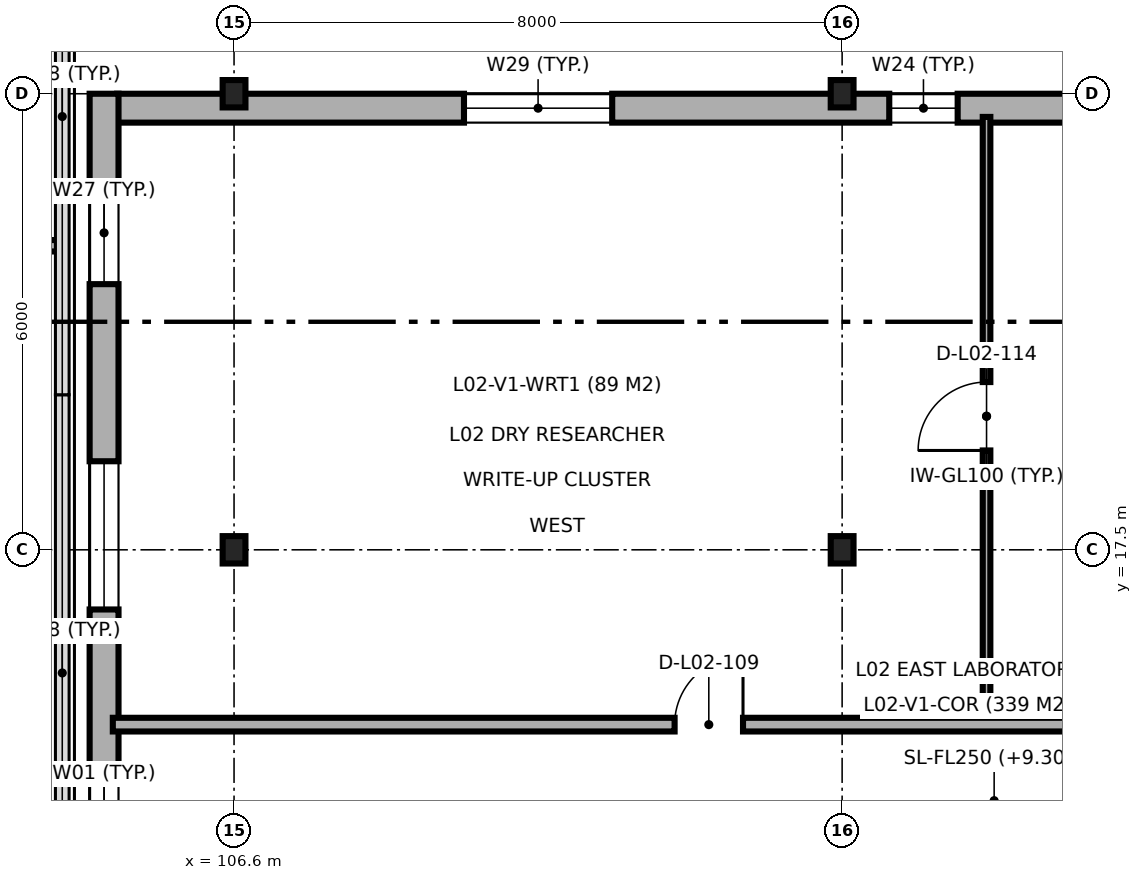
"""IFC4 building model, lengths in metres.
Left out: names, types, materials, properties, quantities, classifications, styles, units other than length and angle.
Written with IfcOpenShell. Run it as: python <this file> out.ifc"""

import sys

from ifc_helpers import new_model, si_unit, direction, frame, frame_2d, origin, origin_2d, place, context, subcontext, project, spatial, rectangle, i_section, extrude, element, fill, save


model = new_model("IFC4")
c1 = context("Model", 3, precision=1e-05, world=origin(), true_north=direction((0.0, 1.0)))
c2 = subcontext(c1, "Body", "Model", "MODEL_VIEW")
j1 = project(units=[si_unit("LENGTHUNIT", "METRE"), si_unit("PLANEANGLEUNIT", "RADIAN")], contexts=[c1])
p1 = place(None, origin())
s1 = spatial("IfcSite", under=j1, at=p1, CompositionType="ELEMENT")
p2 = place(p1, origin())
s2 = spatial("IfcBuilding", under=s1, at=p2, CompositionType="ELEMENT")
p3 = place(p2, frame((0.0, 0.0, 9.3)))
s3 = spatial("IfcBuildingStorey", under=s2, at=p3, CompositionType="ELEMENT", Elevation=9.3)
for number, where, z_axis, x_axis in (
    (1, (106.6, 17.5, 0.0), (0.0, 0.0, 1.0), (1.0, 0.0, 0.0)),
    (2, (106.6, 23.5, 0.0), (0.0, 0.0, 1.0), (1.0, 0.0, 0.0)),
    (3, (114.6, 17.5, 0.0), (0.0, 0.0, 1.0), (1.0, 0.0, 0.0)),
    (4, (114.6, 23.5, 0.0), (0.0, 0.0, 1.0), (1.0, 0.0, 0.0)),
):
    element("IfcColumn", number, at=place(p3, frame(where, z_axis=z_axis, x_axis=x_axis)), inside=s3, PredefinedType="COLUMN", context=c2, shape_type="SweptSolid", body=[
        extrude(i_section(OverallWidth=0.3, OverallDepth=0.36, WebThickness=0.012, FlangeThickness=0.022, FilletRadius=0.027, at=origin_2d()), origin(), (0.0, 0.0, 1.0), 4.5),
    ])
p4 = place(p3, frame((138.962, 23.31, 0.0), z_axis=(0.0, 0.0, 1.0), x_axis=(-1.0, 0.0, 0.0)))
e5 = element("IfcWall", 5, at=p4, inside=s3, PredefinedType="SOLIDWALL", context=c2, shape_type="SweptSolid", body=[
    extrude(rectangle(XDim=33.9, YDim=0.38, at=frame_2d((16.95, 0.0))), origin(), (0.0, 0.0, 1.0), 4.25),
])
p5 = place(p4, frame((3.282, 0.0, 0.9)))
e6 = element("IfcOpeningElement", 6, at=p5, cuts=e5, PredefinedType="OPENING", context=c2, shape_type="SweptSolid", body=[
    extrude(rectangle(XDim=2.0, YDim=2.4, at=frame_2d((1.0, 1.2))), frame((0.0, 0.2, 0.0), z_axis=(0.0, -1.0, 0.0), x_axis=(1.0, 0.0, 0.0)), (0.0, 0.0, 1.0), 0.4),
])
p6 = place(p4, frame((10.762, 0.0, 0.9)))
e7 = element("IfcOpeningElement", 7, at=p6, cuts=e5, PredefinedType="OPENING", context=c2, shape_type="SweptSolid", body=[
    extrude(rectangle(XDim=3.2, YDim=2.4, at=frame_2d((1.6, 1.2))), frame((0.0, 0.2, 0.0), z_axis=(0.0, -1.0, 0.0), x_axis=(1.0, 0.0, 0.0)), (0.0, 0.0, 1.0), 0.4),
])
p7 = place(p4, frame((19.862, 0.0, 0.9)))
e8 = element("IfcOpeningElement", 8, at=p7, cuts=e5, PredefinedType="OPENING", context=c2, shape_type="SweptSolid", body=[
    extrude(rectangle(XDim=0.9, YDim=1.4, at=frame_2d((0.45, 0.7))), frame((0.0, 0.2, 0.0), z_axis=(0.0, -1.0, 0.0), x_axis=(1.0, 0.0, 0.0)), (0.0, 0.0, 1.0), 0.4),
])
p8 = place(p4, frame((22.842, 0.0, 0.9)))
e9 = element("IfcOpeningElement", 9, at=p8, cuts=e5, PredefinedType="OPENING", context=c2, shape_type="SweptSolid", body=[
    extrude(rectangle(XDim=0.9, YDim=1.8, at=frame_2d((0.45, 0.9))), frame((0.0, 0.2, 0.0), z_axis=(0.0, -1.0, 0.0), x_axis=(1.0, 0.0, 0.0)), (0.0, 0.0, 1.0), 0.4),
])
p9 = place(p4, frame((27.387, 0.0, 0.9)))
e10 = element("IfcOpeningElement", 10, at=p9, cuts=e5, PredefinedType="OPENING", context=c2, shape_type="SweptSolid", body=[
    extrude(rectangle(XDim=1.95, YDim=1.95, at=frame_2d((0.975, 0.975))), frame((0.0, 0.2, 0.0), z_axis=(0.0, -1.0, 0.0), x_axis=(1.0, 0.0, 0.0)), (0.0, 0.0, 1.0), 0.4),
])
p10 = place(p3, frame((104.89, 23.5, 0.0), z_axis=(0.0, 0.0, 1.0), x_axis=(0.0, -1.0, 0.0)))
e11 = element("IfcWall", 11, at=p10, inside=s3, PredefinedType="SOLIDWALL", context=c2, shape_type="SweptSolid", body=[
    extrude(rectangle(XDim=18.6, YDim=0.38, at=frame_2d((9.3, 0.0))), origin(), (0.0, 0.0, 1.0), 4.25),
])
p11 = place(p10, frame((1.155, 0.0, 0.9)))
e12 = element("IfcOpeningElement", 12, at=p11, cuts=e11, PredefinedType="OPENING", context=c2, shape_type="SweptSolid", body=[
    extrude(rectangle(XDim=1.35, YDim=1.95, at=frame_2d((0.675, 0.975))), frame((0.0, 0.2, 0.0), z_axis=(0.0, -1.0, 0.0), x_axis=(1.0, 0.0, 0.0)), (0.0, 0.0, 1.0), 0.4),
])
p12 = place(p10, frame((4.835, 0.0, 0.9)))
e13 = element("IfcOpeningElement", 13, at=p12, cuts=e11, PredefinedType="OPENING", context=c2, shape_type="SweptSolid", body=[
    extrude(rectangle(XDim=1.95, YDim=1.95, at=frame_2d((0.975, 0.975))), frame((0.0, 0.2, 0.0), z_axis=(0.0, -1.0, 0.0), x_axis=(1.0, 0.0, 0.0)), (0.0, 0.0, 1.0), 0.4),
])
p13 = place(p10, frame((8.9, 0.0, 0.9)))
e14 = element("IfcOpeningElement", 14, at=p13, cuts=e11, PredefinedType="OPENING", context=c2, shape_type="SweptSolid", body=[
    extrude(rectangle(XDim=1.2, YDim=1.8, at=frame_2d((0.6, 0.9))), frame((0.0, 0.2, 0.0), z_axis=(0.0, -1.0, 0.0), x_axis=(1.0, 0.0, 0.0)), (0.0, 0.0, 1.0), 0.4),
])
p14 = place(p10, frame((13.78, 0.0, 0.9)))
e15 = element("IfcOpeningElement", 15, at=p14, cuts=e11, PredefinedType="OPENING", context=c2, shape_type="SweptSolid", body=[
    extrude(rectangle(XDim=1.4, YDim=1.65, at=frame_2d((0.7, 0.825))), frame((0.0, 0.2, 0.0), z_axis=(0.0, -1.0, 0.0), x_axis=(1.0, 0.0, 0.0)), (0.0, 0.0, 1.0), 0.4),
])
p15 = place(p3, frame((105.005, 15.2, 0.0), z_axis=(0.0, 0.0, 1.0), x_axis=(1.0, 0.0, 0.0)))
e16 = element("IfcWall", 16, at=p15, inside=s3, PredefinedType="PARTITIONING", context=c2, shape_type="SweptSolid", body=[
    extrude(rectangle(XDim=34.495, YDim=0.18, at=frame_2d((17.248, 0.0))), origin(), (0.0, 0.0, 1.0), 4.25),
])
p16 = place(p15, frame((7.391, 0.0, 0.0)))
e17 = element("IfcOpeningElement", 17, at=p16, cuts=e16, PredefinedType="OPENING", context=c2, shape_type="SweptSolid", body=[
    extrude(rectangle(XDim=0.9, YDim=2.1, at=frame_2d((0.45, 1.05))), frame((0.0, 0.1, 0.0), z_axis=(0.0, -1.0, 0.0), x_axis=(1.0, 0.0, 0.0)), (0.0, 0.0, 1.0), 0.2),
])
p17 = place(p15, frame((18.45, 0.0, 0.0)))
e18 = element("IfcOpeningElement", 18, at=p17, cuts=e16, PredefinedType="OPENING", context=c2, shape_type="SweptSolid", body=[
    extrude(rectangle(XDim=0.95, YDim=2.1, at=frame_2d((0.475, 1.05))), frame((0.0, 0.1, 0.0), z_axis=(0.0, -1.0, 0.0), x_axis=(1.0, 0.0, 0.0)), (0.0, 0.0, 1.0), 0.2),
])
p18 = place(p15, frame((27.466, 0.0, 0.0)))
e19 = element("IfcOpeningElement", 19, at=p18, cuts=e16, PredefinedType="OPENING", context=c2, shape_type="SweptSolid", body=[
    extrude(rectangle(XDim=1.0, YDim=2.15, at=frame_2d((0.5, 1.075))), frame((0.0, 0.1, 0.0), z_axis=(0.0, -1.0, 0.0), x_axis=(1.0, 0.0, 0.0)), (0.0, 0.0, 1.0), 0.2),
])
p19 = place(p3, frame((116.5, 15.32, 0.0), z_axis=(0.0, 0.0, 1.0), x_axis=(0.0, 1.0, 0.0)))
e20 = element("IfcWall", 20, at=p19, inside=s3, PredefinedType="PARTITIONING", context=c2, shape_type="SweptSolid", body=[
    extrude(rectangle(XDim=7.875, YDim=0.1, at=frame_2d((3.938, 0.0))), origin(), (0.0, 0.0, 1.0), 4.25),
])
p20 = place(p19, frame((3.487, 0.0, 0.0)))
e21 = element("IfcOpeningElement", 21, at=p20, cuts=e20, PredefinedType="OPENING", context=c2, shape_type="SweptSolid", body=[
    extrude(rectangle(XDim=0.9, YDim=2.1, at=frame_2d((0.45, 1.05))), frame((0.0, 0.06, 0.0), z_axis=(0.0, -1.0, 0.0), x_axis=(1.0, 0.0, 0.0)), (0.0, 0.0, 1.0), 0.12),
])
p21 = place(p3, frame((96.65, 21.5, 0.0), z_axis=(0.0, 0.0, 1.0), x_axis=(1.0, 0.0, 0.0)))
e22 = element("IfcWall", 22, at=p21, inside=s3, PredefinedType="PARTITIONING", context=c2, shape_type="SweptSolid", body=[
    extrude(rectangle(XDim=7.63, YDim=0.15, at=frame_2d((3.815, 0.0))), origin(), (0.0, 0.0, 1.0), 4.25),
])
p22 = place(p8, origin())
e23 = element("IfcWindow", 23, at=p22, inside=s3, PartitioningType="SINGLE_PANEL", PredefinedType="WINDOW", context=c2, shape_type="SweptSolid", body=[
    extrude(rectangle(XDim=0.9, YDim=1.8, at=frame_2d((0.45, 0.9))), frame((0.0, 0.03, 0.0), z_axis=(0.0, -1.0, 0.0), x_axis=(1.0, 0.0, 0.0)), (0.0, 0.0, 1.0), 0.06),
])
fill(e9, e23)
p23 = place(p9, origin())
e24 = element("IfcWindow", 24, at=p23, inside=s3, PartitioningType="SINGLE_PANEL", PredefinedType="WINDOW", context=c2, shape_type="SweptSolid", body=[
    extrude(rectangle(XDim=1.95, YDim=1.95, at=frame_2d((0.975, 0.975))), frame((0.0, 0.03, 0.0), z_axis=(0.0, -1.0, 0.0), x_axis=(1.0, 0.0, 0.0)), (0.0, 0.0, 1.0), 0.06),
])
fill(e10, e24)
p24 = place(p11, origin())
e25 = element("IfcWindow", 25, at=p24, inside=s3, PartitioningType="SINGLE_PANEL", PredefinedType="WINDOW", context=c2, shape_type="SweptSolid", body=[
    extrude(rectangle(XDim=1.35, YDim=1.95, at=frame_2d((0.675, 0.975))), frame((0.0, 0.03, 0.0), z_axis=(0.0, -1.0, 0.0), x_axis=(1.0, 0.0, 0.0)), (0.0, 0.0, 1.0), 0.06),
])
fill(e12, e25)
p25 = place(p12, origin())
e26 = element("IfcWindow", 26, at=p25, inside=s3, PartitioningType="SINGLE_PANEL", PredefinedType="WINDOW", context=c2, shape_type="SweptSolid", body=[
    extrude(rectangle(XDim=1.95, YDim=1.95, at=frame_2d((0.975, 0.975))), frame((0.0, 0.03, 0.0), z_axis=(0.0, -1.0, 0.0), x_axis=(1.0, 0.0, 0.0)), (0.0, 0.0, 1.0), 0.06),
])
fill(e13, e26)
p26 = place(p13, origin())
e27 = element("IfcWindow", 27, at=p26, inside=s3, PartitioningType="SINGLE_PANEL", PredefinedType="WINDOW", context=c2, shape_type="SweptSolid", body=[
    extrude(rectangle(XDim=1.2, YDim=1.8, at=frame_2d((0.6, 0.9))), frame((0.0, 0.03, 0.0), z_axis=(0.0, -1.0, 0.0), x_axis=(1.0, 0.0, 0.0)), (0.0, 0.0, 1.0), 0.06),
])
fill(e14, e27)
p27 = place(p16, origin())
e28 = element("IfcDoor", 28, at=p27, inside=s3, OperationType="SINGLE_SWING_RIGHT", PredefinedType="DOOR", context=c2, shape_type="SweptSolid", body=[
    extrude(rectangle(XDim=0.9, YDim=2.1, at=frame_2d((0.45, 1.05))), frame((0.0, 0.025, 0.0), z_axis=(0.0, -1.0, 0.0), x_axis=(1.0, 0.0, 0.0)), (0.0, 0.0, 1.0), 0.05),
])
fill(e17, e28)
p28 = place(p20, origin())
e29 = element("IfcDoor", 29, at=p28, inside=s3, OperationType="SINGLE_SWING_LEFT", PredefinedType="DOOR", context=c2, shape_type="SweptSolid", body=[
    extrude(rectangle(XDim=0.9, YDim=2.1, at=frame_2d((0.45, 1.05))), frame((0.0, 0.025, 0.0), z_axis=(0.0, -1.0, 0.0), x_axis=(1.0, 0.0, 0.0)), (0.0, 0.0, 1.0), 0.05),
])
fill(e21, e29)
save(model, sys.argv[1])
